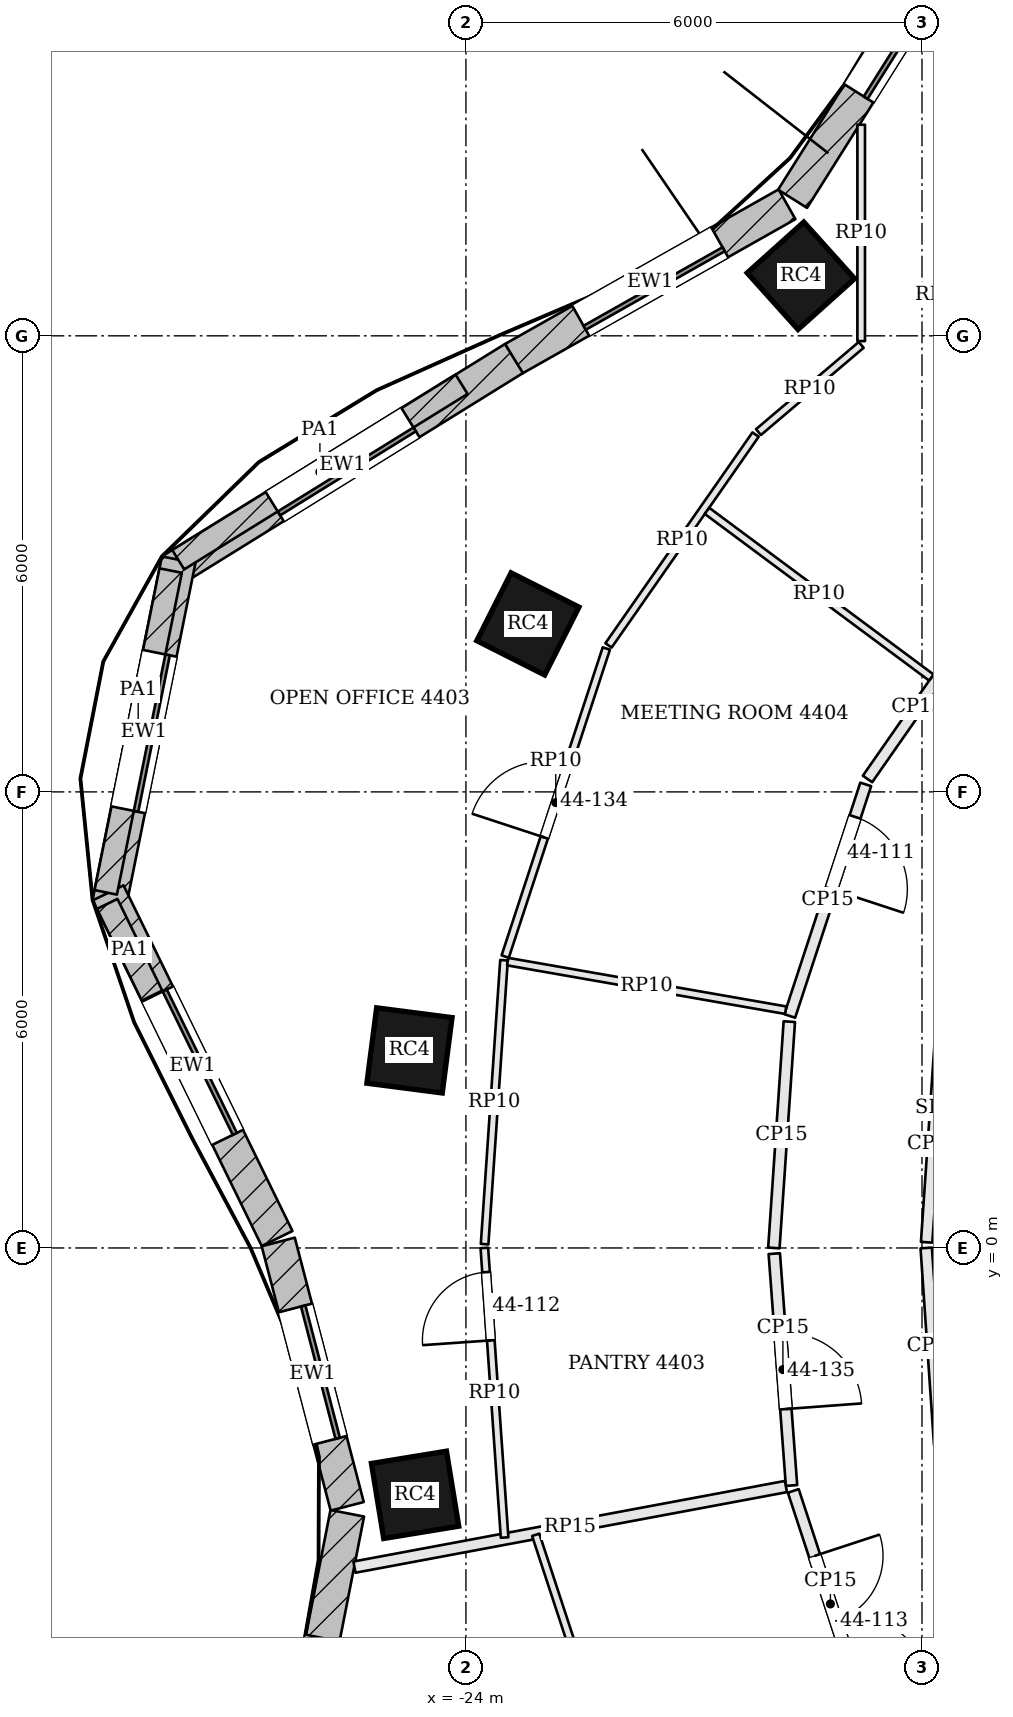
"""IFC4 building model, lengths in metres.
Left out: names, types, materials, properties, quantities, classifications, styles, units other than length and angle.
Written with IfcOpenShell. Run it as: python <this file> out.ifc"""

import sys

from ifc_helpers import new_model, si_unit, direction, frame, frame_2d, origin, origin_2d, place, context, subcontext, project, spatial, rectangle, extrude, element, fill, save


model = new_model("IFC4")
c1 = context("Model", 3, precision=1e-05, world=origin(), true_north=direction((0.0, 1.0)))
c2 = subcontext(c1, "Body", "Model", "MODEL_VIEW")
j1 = project(units=[si_unit("LENGTHUNIT", "METRE"), si_unit("PLANEANGLEUNIT", "RADIAN")], contexts=[c1])
p1 = place(None, origin())
s1 = spatial("IfcSite", under=j1, at=p1, CompositionType="ELEMENT")
p2 = place(p1, origin())
s2 = spatial("IfcBuilding", under=s1, at=p2, CompositionType="ELEMENT")
p3 = place(p2, frame((0.0, 0.0, 181.8)))
s3 = spatial("IfcBuildingStorey", under=s2, at=p3, CompositionType="ELEMENT", Elevation=181.8)
for number, where, z_axis, x_axis in (
    (1, (-19.593, 12.79, 0.0), (0.0, 0.0, 1.0), (-0.744, -0.668, 0.0)),
    (2, (-23.185, 8.21, 0.0), (0.0, 0.0, 1.0), (-0.451, -0.893, 0.0)),
    (3, (-24.743, 2.599, 0.0), (0.0, 0.0, 1.0), (-0.128, -0.992, 0.0)),
    (4, (-24.669, -3.248, 0.0), (0.0, 0.0, 1.0), (0.162, -0.987, 0.0)),
):
    element("IfcColumn", number, at=place(p3, frame(where, z_axis=z_axis, x_axis=x_axis)), inside=s3, PredefinedType="COLUMN", context=c2, shape_type="SweptSolid", body=[
        extrude(rectangle(XDim=1.0, YDim=1.0, at=origin_2d()), origin(), (0.0, 0.0, 1.0), 3.9),
    ])
p4 = place(p3, frame((-16.998, 18.099, 0.0), z_axis=(0.0, 0.0, 1.0), x_axis=(-0.532745661304, -0.846275404559, 0.0)))
e5 = element("IfcWall", 5, at=p4, inside=s3, PredefinedType="SOLIDWALL", context=c2, shape_type="SweptSolid", body=[
    extrude(rectangle(XDim=5.076, YDim=0.45, at=frame_2d((2.538, 0.0))), origin(), (0.0, 0.0, 1.0), 3.7),
])
p5 = place(p4, frame((1.638, 0.0, 0.9)))
e6 = element("IfcOpeningElement", 6, at=p5, cuts=e5, PredefinedType="OPENING", context=c2, shape_type="SweptSolid", body=[
    extrude(rectangle(XDim=1.8, YDim=2.3, at=frame_2d((0.9, 1.15))), frame((0.0, 0.235, 0.0), z_axis=(0.0, -1.0, 0.0), x_axis=(1.0, 0.0, 0.0)), (0.0, 0.0, 1.0), 0.47),
])
p6 = place(p3, frame((-19.776, 13.731, 0.0), z_axis=(0.0, 0.0, 1.0), x_axis=(-0.870610133829, -0.491973571318, 0.0)))
e7 = element("IfcWall", 7, at=p6, inside=s3, PredefinedType="SOLIDWALL", context=c2, shape_type="SweptSolid", body=[
    extrude(rectangle(XDim=4.134, YDim=0.45, at=frame_2d((2.067, 0.0))), origin(), (0.0, 0.0, 1.0), 3.7),
])
p7 = place(p6, frame((1.017, 0.0, 0.9)))
e8 = element("IfcOpeningElement", 8, at=p7, cuts=e7, PredefinedType="OPENING", context=c2, shape_type="SweptSolid", body=[
    extrude(rectangle(XDim=2.1, YDim=2.3, at=frame_2d((1.05, 1.15))), frame((0.0, 0.235, 0.0), z_axis=(0.0, -1.0, 0.0), x_axis=(1.0, 0.0, 0.0)), (0.0, 0.0, 1.0), 0.47),
])
p8 = place(p3, frame((-23.368, 11.701, 0.0), z_axis=(0.0, 0.0, 1.0), x_axis=(-0.850251408633, -0.526376806211, 0.0)))
e9 = element("IfcWall", 9, at=p8, inside=s3, PredefinedType="SOLIDWALL", context=c2, shape_type="SweptSolid", body=[
    extrude(rectangle(XDim=5.302, YDim=0.45, at=frame_2d((2.651, 0.0))), origin(), (0.0, 0.0, 1.0), 3.7),
])
p9 = place(p8, frame((1.601, 0.0, 0.9)))
e10 = element("IfcOpeningElement", 10, at=p9, cuts=e9, PredefinedType="OPENING", context=c2, shape_type="SweptSolid", body=[
    extrude(rectangle(XDim=2.1, YDim=2.3, at=frame_2d((1.05, 1.15))), frame((0.0, 0.235, 0.0), z_axis=(0.0, -1.0, 0.0), x_axis=(1.0, 0.0, 0.0)), (0.0, 0.0, 1.0), 0.47),
])
p10 = place(p3, frame((-27.78, 9.053, 0.0), z_axis=(0.0, 0.0, 1.0), x_axis=(-0.197796229105, -0.980243159503, 0.0)))
e11 = element("IfcWall", 11, at=p10, inside=s3, PredefinedType="SOLIDWALL", context=c2, shape_type="SweptSolid", body=[
    extrude(rectangle(XDim=4.61, YDim=0.45, at=frame_2d((2.305, 0.0))), origin(), (0.0, 0.0, 1.0), 3.7),
])
p11 = place(p10, frame((1.255, 0.0, 0.9)))
e12 = element("IfcOpeningElement", 12, at=p11, cuts=e11, PredefinedType="OPENING", context=c2, shape_type="SweptSolid", body=[
    extrude(rectangle(XDim=2.1, YDim=2.3, at=frame_2d((1.05, 1.15))), frame((0.0, 0.235, 0.0), z_axis=(0.0, -1.0, 0.0), x_axis=(1.0, 0.0, 0.0)), (0.0, 0.0, 1.0), 0.47),
])
p12 = place(p3, frame((-28.707, 4.672, 0.0), z_axis=(0.0, 0.0, 1.0), x_axis=(0.439053549989, -0.898460895221, 0.0)))
e13 = element("IfcWall", 13, at=p12, inside=s3, PredefinedType="SOLIDWALL", context=c2, shape_type="SweptSolid", body=[
    extrude(rectangle(XDim=5.062, YDim=0.45, at=frame_2d((2.531, 0.0))), origin(), (0.0, 0.0, 1.0), 3.7),
])
p13 = place(p12, frame((1.481, 0.0, 0.9)))
e14 = element("IfcOpeningElement", 14, at=p13, cuts=e13, PredefinedType="OPENING", context=c2, shape_type="SweptSolid", body=[
    extrude(rectangle(XDim=2.1, YDim=2.3, at=frame_2d((1.05, 1.15))), frame((0.0, 0.235, 0.0), z_axis=(0.0, -1.0, 0.0), x_axis=(1.0, 0.0, 0.0)), (0.0, 0.0, 1.0), 0.47),
])
p14 = place(p3, frame((-26.469, 0.079, 0.0), z_axis=(0.0, 0.0, 1.0), x_axis=(0.252446779859, -0.967610780913, 0.0)))
e15 = element("IfcWall", 15, at=p14, inside=s3, PredefinedType="SOLIDWALL", context=c2, shape_type="SweptSolid", body=[
    extrude(rectangle(XDim=3.595, YDim=0.45, at=frame_2d((1.797, 0.0))), origin(), (0.0, 0.0, 1.0), 3.7),
])
p15 = place(p14, frame((0.897, 0.0, 0.9)))
e16 = element("IfcOpeningElement", 16, at=p15, cuts=e15, PredefinedType="OPENING", context=c2, shape_type="SweptSolid", body=[
    extrude(rectangle(XDim=1.8, YDim=2.3, at=frame_2d((0.9, 1.15))), frame((0.0, 0.235, 0.0), z_axis=(0.0, -1.0, 0.0), x_axis=(1.0, 0.0, 0.0)), (0.0, 0.0, 1.0), 0.47),
])
p16 = place(p3, frame((-25.561, -3.49, 0.0), z_axis=(0.0, 0.0, 1.0), x_axis=(-0.192494026297, -0.981298145234, 0.0)))
e17 = element("IfcWall", 17, at=p16, inside=s3, PredefinedType="SOLIDWALL", context=c2, shape_type="SweptSolid", body=[
    extrude(rectangle(XDim=5.446, YDim=0.45, at=frame_2d((2.723, 0.0))), origin(), (0.0, 0.0, 1.0), 3.7),
])
p17 = place(p16, frame((1.673, 0.0, 0.9)))
e18 = element("IfcOpeningElement", 18, at=p17, cuts=e17, PredefinedType="OPENING", context=c2, shape_type="SweptSolid", body=[
    extrude(rectangle(XDim=2.1, YDim=2.3, at=frame_2d((1.05, 1.15))), frame((0.0, 0.235, 0.0), z_axis=(0.0, -1.0, 0.0), x_axis=(1.0, 0.0, 0.0)), (0.0, 0.0, 1.0), 0.47),
])
p18 = place(p3, frame((-24.057, 11.363, 3.9), z_axis=(0.0, 0.0, 1.0), x_axis=(-0.85023666639, -0.526400618471, 0.0)))
e19 = element("IfcWall", 19, at=p18, inside=s3, PredefinedType="PARAPET", context=c2, shape_type="SweptSolid", body=[
    extrude(rectangle(XDim=4.385, YDim=0.3, at=frame_2d((2.192, 0.0))), origin(), (0.0, 0.0, 1.0), 1.1),
])
p19 = place(p3, frame((-27.885, 8.912, 3.9), z_axis=(0.0, 0.0, 1.0), x_axis=(-0.197855213088, -0.980231255701, 0.0)))
e20 = element("IfcWall", 20, at=p19, inside=s3, PredefinedType="PARAPET", context=c2, shape_type="SweptSolid", body=[
    extrude(rectangle(XDim=4.319, YDim=0.3, at=frame_2d((2.159, 0.0))), origin(), (0.0, 0.0, 1.0), 1.1),
])
p20 = place(p3, frame((-28.719, 4.526, 3.9), z_axis=(0.0, 0.0, 1.0), x_axis=(0.439122076977, -0.898427404697, 0.0)))
e21 = element("IfcWall", 21, at=p20, inside=s3, PredefinedType="PARAPET", context=c2, shape_type="SweptSolid", body=[
    extrude(rectangle(XDim=1.343, YDim=0.3, at=frame_2d((0.671, 0.0))), origin(), (0.0, 0.0, 1.0), 1.1),
])
p21 = place(p3, frame((-17.397, 8.062, 0.0), z_axis=(0.0, 0.0, 1.0), x_axis=(-0.572118665737, -0.820170855563, 0.0)))
e22 = element("IfcWall", 22, at=p21, inside=s3, PredefinedType="PARTITIONING", context=c2, shape_type="SweptSolid", body=[
    extrude(rectangle(XDim=2.306, YDim=0.15, at=frame_2d((1.153, 0.0))), origin(), (0.0, 0.0, 1.0), 3.084),
])
p22 = place(p3, frame((-18.74, 6.099, 0.0), z_axis=(0.0, 0.0, 1.0), x_axis=(-0.31188427026, -0.950120098706, 0.0)))
e23 = element("IfcWall", 23, at=p22, inside=s3, PredefinedType="PARTITIONING", context=c2, shape_type="SweptSolid", body=[
    extrude(rectangle(XDim=3.206, YDim=0.15, at=frame_2d((1.603, 0.0))), origin(), (0.0, 0.0, 1.0), 3.084),
])
p23 = place(p22, frame((0.45, 0.0, 0.0)))
e24 = element("IfcOpeningElement", 24, at=p23, cuts=e23, PredefinedType="OPENING", context=c2, shape_type="SweptSolid", body=[
    extrude(rectangle(XDim=1.0, YDim=2.4, at=frame_2d((0.5, 1.2))), frame((0.0, 0.085, 0.0), z_axis=(0.0, -1.0, 0.0), x_axis=(1.0, 0.0, 0.0)), (0.0, 0.0, 1.0), 0.17),
])
p24 = place(p3, frame((-19.745, 2.978, 0.0), z_axis=(0.0, 0.0, 1.0), x_axis=(-0.068142324, -0.997675610447, 0.0)))
e25 = element("IfcWall", 25, at=p24, inside=s3, PredefinedType="PARTITIONING", context=c2, shape_type="SweptSolid", body=[
    extrude(rectangle(XDim=2.984, YDim=0.15, at=frame_2d((1.492, 0.0))), origin(), (0.0, 0.0, 1.0), 3.084),
])
p25 = place(p3, frame((-19.943, -0.075, 0.0), z_axis=(0.0, 0.0, 1.0), x_axis=(0.074071611523, -0.997252924973, 0.0)))
e26 = element("IfcWall", 26, at=p25, inside=s3, PredefinedType="PARTITIONING", context=c2, shape_type="SweptSolid", body=[
    extrude(rectangle(XDim=3.059, YDim=0.15, at=frame_2d((1.529, 0.0))), origin(), (0.0, 0.0, 1.0), 3.084),
])
p26 = place(p25, frame((1.05, 0.0, 0.0)))
e27 = element("IfcOpeningElement", 27, at=p26, cuts=e26, PredefinedType="OPENING", context=c2, shape_type="SweptSolid", body=[
    extrude(rectangle(XDim=1.0, YDim=2.1, at=frame_2d((0.5, 1.05))), frame((0.0, 0.085, 0.0), z_axis=(0.0, -1.0, 0.0), x_axis=(1.0, 0.0, 0.0)), (0.0, 0.0, 1.0), 0.17),
])
p27 = place(p3, frame((-25.467, -4.199, 0.0), z_axis=(0.0, 0.0, 1.0), x_axis=(0.982998787258, 0.183612048216, 0.0)))
e28 = element("IfcWall", 28, at=p27, inside=s3, PredefinedType="PARTITIONING", context=c2, shape_type="SweptSolid", body=[
    extrude(rectangle(XDim=5.775, YDim=0.15, at=frame_2d((2.887, 0.0))), origin(), (0.0, 0.0, 1.0), 3.234),
])
p28 = place(p3, frame((-19.693, -3.196, 0.0), z_axis=(0.0, 0.0, 1.0), x_axis=(0.311918951318, -0.950108713679, 0.0)))
e29 = element("IfcWall", 29, at=p28, inside=s3, PredefinedType="PARTITIONING", context=c2, shape_type="SweptSolid", body=[
    extrude(rectangle(XDim=3.13, YDim=0.15, at=frame_2d((1.565, 0.0))), origin(), (0.0, 0.0, 1.0), 3.084),
])
p29 = place(p28, frame((0.9, 0.0, 0.0)))
e30 = element("IfcOpeningElement", 30, at=p29, cuts=e29, PredefinedType="OPENING", context=c2, shape_type="SweptSolid", body=[
    extrude(rectangle(XDim=1.8, YDim=2.1, at=frame_2d((0.9, 1.05))), frame((0.0, 0.085, 0.0), z_axis=(0.0, -1.0, 0.0), x_axis=(1.0, 0.0, 0.0)), (0.0, 0.0, 1.0), 0.17),
])
p30 = place(p3, frame((-17.767, -2.592, 0.0), z_axis=(0.0, 0.0, 1.0), x_axis=(-0.068140828228, 0.997675712608, 0.0)))
e31 = element("IfcWall", 31, at=p30, inside=s3, PredefinedType="PARTITIONING", context=c2, shape_type="SweptSolid", body=[
    extrude(rectangle(XDim=2.598, YDim=0.15, at=frame_2d((1.299, 0.0))), origin(), (0.0, 0.0, 1.0), 3.084),
])
p31 = place(p3, frame((-17.939, 0.075, 0.0), z_axis=(0.0, 0.0, 1.0), x_axis=(0.068227980697, 0.997669756307, 0.0)))
e32 = element("IfcWall", 32, at=p31, inside=s3, PredefinedType="PARTITIONING", context=c2, shape_type="SweptSolid", body=[
    extrude(rectangle(XDim=2.598, YDim=0.15, at=frame_2d((1.299, 0.0))), origin(), (0.0, 0.0, 1.0), 3.084),
])
p32 = place(p3, frame((-23.491, -3.81, 0.0), z_axis=(0.0, 0.0, 1.0), x_axis=(-0.069811314636, 0.997560213896, 0.0)))
e33 = element("IfcWall", 33, at=p32, inside=s3, PredefinedType="PARTITIONING", context=c2, shape_type="SweptSolid", body=[
    extrude(rectangle(XDim=3.819, YDim=0.1, at=frame_2d((1.909, 0.0))), origin(), (0.0, 0.0, 1.0), 3.084),
])
p33 = place(p32, frame((2.6, 0.0, 0.0)))
e34 = element("IfcOpeningElement", 34, at=p33, cuts=e33, PredefinedType="OPENING", context=c2, shape_type="SweptSolid", body=[
    extrude(rectangle(XDim=0.9, YDim=2.1, at=frame_2d((0.45, 1.05))), frame((0.0, 0.06, 0.0), z_axis=(0.0, -1.0, 0.0), x_axis=(1.0, 0.0, 0.0)), (0.0, 0.0, 1.0), 0.12),
])
p34 = place(p3, frame((-23.754, 0.05, 0.0), z_axis=(0.0, 0.0, 1.0), x_axis=(0.068193493527, 0.997672114194, 0.0)))
e35 = element("IfcWall", 35, at=p34, inside=s3, PredefinedType="PARTITIONING", context=c2, shape_type="SweptSolid", body=[
    extrude(rectangle(XDim=3.745, YDim=0.1, at=frame_2d((1.873, 0.0))), origin(), (0.0, 0.0, 1.0), 3.084),
])
p35 = place(p3, frame((-23.483, 3.833, 0.0), z_axis=(0.0, 0.0, 1.0), x_axis=(0.311880220566, 0.95012142804, 0.0)))
e36 = element("IfcWall", 36, at=p35, inside=s3, PredefinedType="PARTITIONING", context=c2, shape_type="SweptSolid", body=[
    extrude(rectangle(XDim=4.265, YDim=0.1, at=frame_2d((2.133, 0.0))), origin(), (0.0, 0.0, 1.0), 3.084),
])
p36 = place(p35, frame((1.65, 0.0, 0.0)))
e37 = element("IfcOpeningElement", 37, at=p36, cuts=e36, PredefinedType="OPENING", context=c2, shape_type="SweptSolid", body=[
    extrude(rectangle(XDim=1.0, YDim=2.4, at=frame_2d((0.5, 1.2))), frame((0.0, 0.06, 0.0), z_axis=(0.0, -1.0, 0.0), x_axis=(1.0, 0.0, 0.0)), (0.0, 0.0, 1.0), 0.12),
])
p37 = place(p3, frame((-22.125, 7.927, 0.0), z_axis=(0.0, 0.0, 1.0), x_axis=(0.572100301866, 0.820183665166, 0.0)))
e38 = element("IfcWall", 38, at=p37, inside=s3, PredefinedType="PARTITIONING", context=c2, shape_type="SweptSolid", body=[
    extrude(rectangle(XDim=3.382, YDim=0.1, at=frame_2d((1.691, 0.0))), origin(), (0.0, 0.0, 1.0), 3.084),
])
p38 = place(p3, frame((-20.151, 10.734, 0.0), z_axis=(0.0, 0.0, 1.0), x_axis=(0.762465888028, 0.647028414827, 0.0)))
e39 = element("IfcWall", 39, at=p38, inside=s3, PredefinedType="PARTITIONING", context=c2, shape_type="SweptSolid", body=[
    extrude(rectangle(XDim=1.772, YDim=0.1, at=frame_2d((0.886, 0.0))), origin(), (0.0, 0.0, 1.0), 3.084),
])
p39 = place(p3, frame((-18.8, 11.93, 0.0), z_axis=(0.0, 0.0, 1.0), x_axis=(0.0, 1.0, 0.0)))
e40 = element("IfcWall", 40, at=p39, inside=s3, PredefinedType="PARTITIONING", context=c2, shape_type="SweptSolid", body=[
    extrude(rectangle(XDim=2.846, YDim=0.1, at=frame_2d((1.423, 0.0))), origin(), (0.0, 0.0, 1.0), 3.084),
])
p40 = place(p3, frame((-17.877, 7.505, 0.0), z_axis=(0.0, 0.0, 1.0), x_axis=(-0.802692989486, 0.596392458563, 0.0)))
e41 = element("IfcWall", 41, at=p40, inside=s3, PredefinedType="PARTITIONING", context=c2, shape_type="SweptSolid", body=[
    extrude(rectangle(XDim=3.677, YDim=0.1, at=frame_2d((1.838, 0.0))), origin(), (0.0, 0.0, 1.0), 3.084),
])
p41 = place(p3, frame((-19.794, 3.128, 0.0), z_axis=(0.0, 0.0, 1.0), x_axis=(-0.985065623684, 0.172179316518, 0.0)))
e42 = element("IfcWall", 42, at=p41, inside=s3, PredefinedType="PARTITIONING", context=c2, shape_type="SweptSolid", body=[
    extrude(rectangle(XDim=3.712, YDim=0.1, at=frame_2d((1.856, 0.0))), origin(), (0.0, 0.0, 1.0), 3.084),
])
p42 = place(p3, frame((-21.807, -7.658, 0.0), z_axis=(0.0, 0.0, 1.0), x_axis=(-0.311924580949, 0.950106865463, 0.0)))
e43 = element("IfcWall", 43, at=p42, inside=s3, PredefinedType="PARTITIONING", context=c2, shape_type="SweptSolid", body=[
    extrude(rectangle(XDim=4.088, YDim=0.1, at=frame_2d((2.044, 0.0))), origin(), (0.0, 0.0, 1.0), 3.084),
])
p43 = place(p42, frame((0.699, 0.0, 0.0)))
e44 = element("IfcOpeningElement", 44, at=p43, cuts=e43, PredefinedType="OPENING", context=c2, shape_type="SweptSolid", body=[
    extrude(rectangle(XDim=1.0, YDim=2.1, at=frame_2d((0.5, 1.05))), frame((0.0, 0.06, 0.0), z_axis=(0.0, -1.0, 0.0), x_axis=(1.0, 0.0, 0.0)), (0.0, 0.0, 1.0), 0.12),
])
p44 = place(p5, origin())
e45 = element("IfcWindow", 45, at=p44, inside=s3, PartitioningType="SINGLE_PANEL", PredefinedType="WINDOW", context=c2, shape_type="SweptSolid", body=[
    extrude(rectangle(XDim=1.8, YDim=2.3, at=frame_2d((0.9, 1.15))), frame((0.0, 0.135, 0.0), z_axis=(0.0, -1.0, 0.0), x_axis=(1.0, 0.0, 0.0)), (0.0, 0.0, 1.0), 0.06),
])
fill(e6, e45)
p45 = place(p7, origin())
e46 = element("IfcWindow", 46, at=p45, inside=s3, PartitioningType="SINGLE_PANEL", PredefinedType="WINDOW", context=c2, shape_type="SweptSolid", body=[
    extrude(rectangle(XDim=2.1, YDim=2.3, at=frame_2d((1.05, 1.15))), frame((0.0, 0.135, 0.0), z_axis=(0.0, -1.0, 0.0), x_axis=(1.0, 0.0, 0.0)), (0.0, 0.0, 1.0), 0.06),
])
fill(e8, e46)
p46 = place(p9, origin())
e47 = element("IfcWindow", 47, at=p46, inside=s3, PartitioningType="SINGLE_PANEL", PredefinedType="WINDOW", context=c2, shape_type="SweptSolid", body=[
    extrude(rectangle(XDim=2.1, YDim=2.3, at=frame_2d((1.05, 1.15))), frame((0.0, 0.135, 0.0), z_axis=(0.0, -1.0, 0.0), x_axis=(1.0, 0.0, 0.0)), (0.0, 0.0, 1.0), 0.06),
])
fill(e10, e47)
p47 = place(p11, origin())
e48 = element("IfcWindow", 48, at=p47, inside=s3, PartitioningType="SINGLE_PANEL", PredefinedType="WINDOW", context=c2, shape_type="SweptSolid", body=[
    extrude(rectangle(XDim=2.1, YDim=2.3, at=frame_2d((1.05, 1.15))), frame((0.0, 0.135, 0.0), z_axis=(0.0, -1.0, 0.0), x_axis=(1.0, 0.0, 0.0)), (0.0, 0.0, 1.0), 0.06),
])
fill(e12, e48)
p48 = place(p13, origin())
e49 = element("IfcWindow", 49, at=p48, inside=s3, PartitioningType="SINGLE_PANEL", PredefinedType="WINDOW", context=c2, shape_type="SweptSolid", body=[
    extrude(rectangle(XDim=2.1, YDim=2.3, at=frame_2d((1.05, 1.15))), frame((0.0, 0.135, 0.0), z_axis=(0.0, -1.0, 0.0), x_axis=(1.0, 0.0, 0.0)), (0.0, 0.0, 1.0), 0.06),
])
fill(e14, e49)
p49 = place(p15, origin())
e50 = element("IfcWindow", 50, at=p49, inside=s3, PartitioningType="SINGLE_PANEL", PredefinedType="WINDOW", context=c2, shape_type="SweptSolid", body=[
    extrude(rectangle(XDim=1.8, YDim=2.3, at=frame_2d((0.9, 1.15))), frame((0.0, 0.135, 0.0), z_axis=(0.0, -1.0, 0.0), x_axis=(1.0, 0.0, 0.0)), (0.0, 0.0, 1.0), 0.06),
])
fill(e16, e50)
p50 = place(p23, origin())
e51 = element("IfcDoor", 51, at=p50, inside=s3, OperationType="SINGLE_SWING_RIGHT", PredefinedType="DOOR", context=c2, shape_type="SweptSolid", body=[
    extrude(rectangle(XDim=1.0, YDim=2.4, at=frame_2d((0.5, 1.2))), frame((0.0, 0.025, 0.0), z_axis=(0.0, -1.0, 0.0), x_axis=(1.0, 0.0, 0.0)), (0.0, 0.0, 1.0), 0.05),
])
fill(e24, e51)
p51 = place(p33, origin())
e52 = element("IfcDoor", 52, at=p51, inside=s3, OperationType="SINGLE_SWING_LEFT", PredefinedType="DOOR", context=c2, shape_type="SweptSolid", body=[
    extrude(rectangle(XDim=0.9, YDim=2.1, at=frame_2d((0.45, 1.05))), frame((0.0, 0.025, 0.0), z_axis=(0.0, -1.0, 0.0), x_axis=(1.0, 0.0, 0.0)), (0.0, 0.0, 1.0), 0.05),
])
fill(e34, e52)
p52 = place(p29, origin())
e53 = element("IfcDoor", 53, at=p52, inside=s3, OperationType="DOUBLE_DOOR_SINGLE_SWING", PredefinedType="DOOR", context=c2, shape_type="SweptSolid", body=[
    extrude(rectangle(XDim=1.8, YDim=2.1, at=frame_2d((0.9, 1.05))), frame((0.0, 0.025, 0.0), z_axis=(0.0, -1.0, 0.0), x_axis=(1.0, 0.0, 0.0)), (0.0, 0.0, 1.0), 0.05),
])
fill(e30, e53)
p53 = place(p36, origin())
e54 = element("IfcDoor", 54, at=p53, inside=s3, OperationType="SINGLE_SWING_LEFT", PredefinedType="DOOR", context=c2, shape_type="SweptSolid", body=[
    extrude(rectangle(XDim=1.0, YDim=2.4, at=frame_2d((0.5, 1.2))), frame((0.0, 0.025, 0.0), z_axis=(0.0, -1.0, 0.0), x_axis=(1.0, 0.0, 0.0)), (0.0, 0.0, 1.0), 0.05),
])
fill(e37, e54)
p54 = place(p26, origin())
e55 = element("IfcDoor", 55, at=p54, inside=s3, OperationType="SINGLE_SWING_RIGHT", PredefinedType="DOOR", context=c2, shape_type="SweptSolid", body=[
    extrude(rectangle(XDim=1.0, YDim=2.1, at=frame_2d((0.5, 1.05))), frame((0.0, 0.025, 0.0), z_axis=(0.0, -1.0, 0.0), x_axis=(1.0, 0.0, 0.0)), (0.0, 0.0, 1.0), 0.05),
])
fill(e27, e55)
save(model, sys.argv[1])
